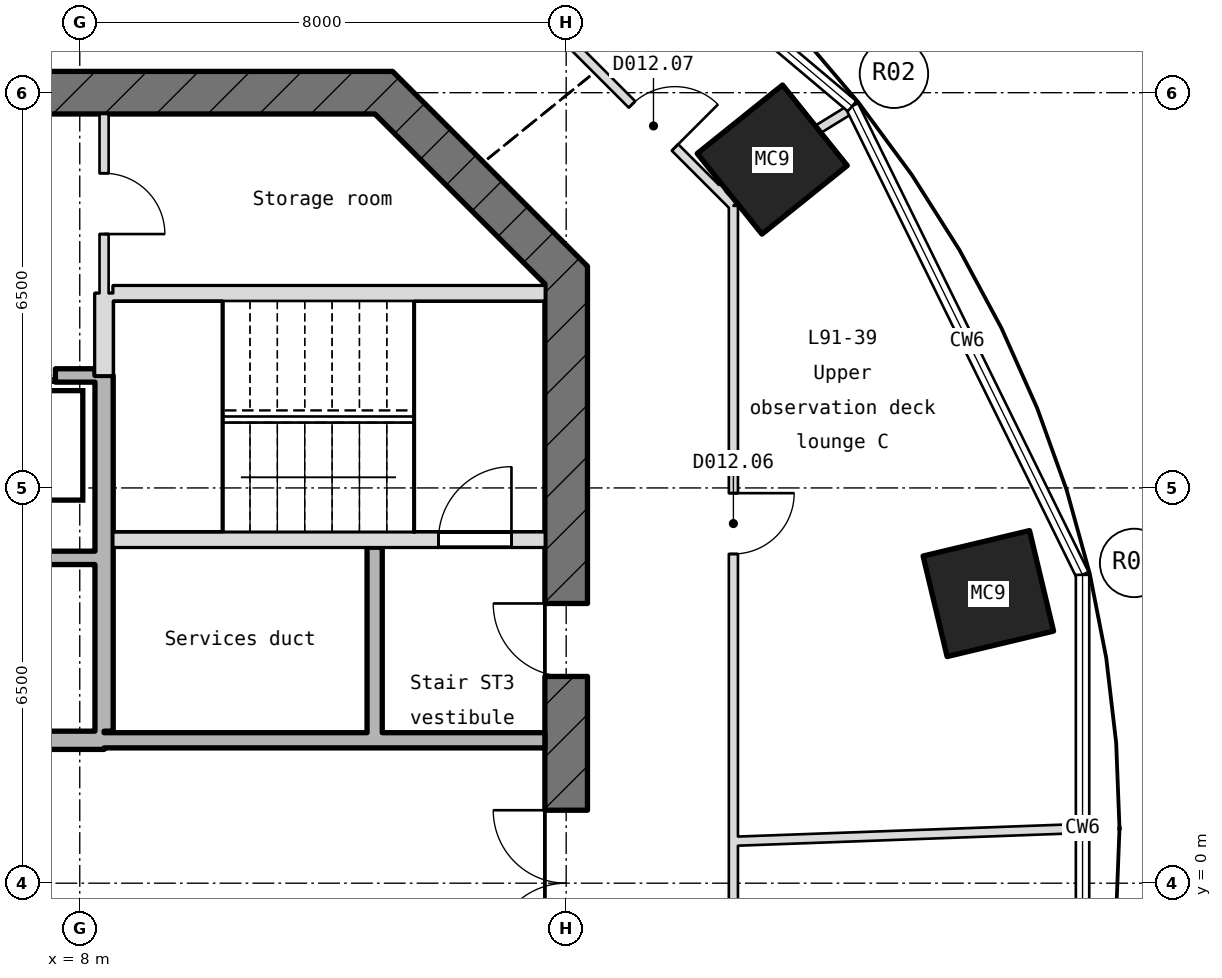
"""IFC4 building model, lengths in metres.
Left out: names, types, materials, properties, quantities, classifications, styles, units other than length and angle.
Written with IfcOpenShell. Run it as: python <this file> out.ifc"""

import sys

from ifc_helpers import new_model, si_unit, direction, frame, frame_2d, origin, origin_2d, place, context, subcontext, project, spatial, rectangle, hollow_rectangle, extrude, element, fill, save


model = new_model("IFC4")
c1 = context("Model", 3, precision=1e-05, world=origin(), true_north=direction((0.0, 1.0)))
c2 = subcontext(c1, "Body", "Model", "MODEL_VIEW")
j1 = project(units=[si_unit("LENGTHUNIT", "METRE"), si_unit("PLANEANGLEUNIT", "RADIAN")], contexts=[c1])
p1 = place(None, origin())
s1 = spatial("IfcSite", under=j1, at=p1, CompositionType="ELEMENT")
p2 = place(p1, origin())
s2 = spatial("IfcBuilding", under=s1, at=p2, CompositionType="ELEMENT")
p3 = place(p2, frame((0.0, 0.0, 401.95)))
s3 = spatial("IfcBuildingStorey", under=s2, at=p3, CompositionType="ELEMENT", Elevation=401.95)
for number, where, z_axis, x_axis in (
    (1, (22.943, 4.763, -0.25), (0.0, 0.0, 1.0), (0.233, -0.973, 0.0)),
    (2, (19.389, 11.9, -0.25), (0.0, 0.0, 1.0), (0.626, -0.78, 0.0)),
):
    element("IfcColumn", number, at=place(p3, frame(where, z_axis=z_axis, x_axis=x_axis)), inside=s3, PredefinedType="COLUMN", context=c2, shape_type="SweptSolid", body=[
        extrude(hollow_rectangle(XDim=1.7, YDim=1.8, WallThickness=0.05, at=origin_2d()), origin(), (0.0, 0.0, 1.0), 5.55),
    ])
p4 = place(p3, frame((16.0, -10.145, -0.25), z_axis=(0.0, 0.0, 1.0), x_axis=(0.0, 1.0, 0.0)))
e3 = element("IfcWall", 3, at=p4, inside=s3, PredefinedType="SHEAR", context=c2, shape_type="SweptSolid", body=[
    extrude(rectangle(XDim=20.29, YDim=0.7, at=frame_2d((10.145, 0.0))), origin(), (0.0, 0.0, 1.0), 5.55),
])
p5 = place(p4, frame((8.945, 0.0, 0.25)))
e4 = element("IfcOpeningElement", 4, at=p5, cuts=e3, PredefinedType="OPENING", context=c2, shape_type="SweptSolid", body=[
    extrude(rectangle(XDim=2.4, YDim=2.1, at=frame_2d((1.2, 1.05))), frame((0.0, 0.36, 0.0), z_axis=(0.0, -1.0, 0.0), x_axis=(1.0, 0.0, 0.0)), (0.0, 0.0, 1.0), 0.72),
])
p6 = place(p4, frame((13.545, 0.0, 0.25)))
e5 = element("IfcOpeningElement", 5, at=p6, cuts=e3, PredefinedType="OPENING", context=c2, shape_type="SweptSolid", body=[
    extrude(rectangle(XDim=1.2, YDim=2.1, at=frame_2d((0.6, 1.05))), frame((0.0, 0.36, 0.0), z_axis=(0.0, -1.0, 0.0), x_axis=(1.0, 0.0, 0.0)), (0.0, 0.0, 1.0), 0.72),
])
p7 = place(p4, frame((2.4, 0.0, 0.25)))
e6 = element("IfcOpeningElement", 6, at=p7, cuts=e3, PredefinedType="OPENING", context=c2, shape_type="SweptSolid", body=[
    extrude(rectangle(XDim=1.2, YDim=2.1, at=frame_2d((0.6, 1.05))), frame((0.0, 0.36, 0.0), z_axis=(0.0, -1.0, 0.0), x_axis=(1.0, 0.0, 0.0)), (0.0, 0.0, 1.0), 0.72),
])
p8 = place(p3, frame((16.103, 9.897, -0.25), z_axis=(0.0, 0.0, 1.0), x_axis=(-0.707106781187, 0.707106781187, 0.0)))
e7 = element("IfcWall", 7, at=p8, inside=s3, PredefinedType="SHEAR", context=c2, shape_type="SweptSolid", body=[
    extrude(rectangle(XDim=4.533, YDim=0.7, at=frame_2d((2.266, 0.0))), origin(), (0.0, 0.0, 1.0), 5.55),
])
p9 = place(p3, frame((13.145, 13.0, -0.25), z_axis=(0.0, 0.0, 1.0), x_axis=(-1.0, 0.0, 0.0)))
e8 = element("IfcWall", 8, at=p9, inside=s3, PredefinedType="SHEAR", context=c2, shape_type="SweptSolid", body=[
    extrude(rectangle(XDim=26.29, YDim=0.7, at=frame_2d((13.145, 0.0))), origin(), (0.0, 0.0, 1.0), 5.55),
])
p10 = place(p9, frame((11.945, 0.0, 0.25)))
e9 = element("IfcOpeningElement", 9, at=p10, cuts=e8, PredefinedType="OPENING", context=c2, shape_type="SweptSolid", body=[
    extrude(rectangle(XDim=2.4, YDim=2.1, at=frame_2d((1.2, 1.05))), frame((0.0, 0.36, 0.0), z_axis=(0.0, -1.0, 0.0), x_axis=(1.0, 0.0, 0.0)), (0.0, 0.0, 1.0), 0.72),
])
p11 = place(p3, frame((-8.4, 2.35, -0.25), z_axis=(0.0, 0.0, 1.0), x_axis=(1.0, 0.0, 0.0)))
e10 = element("IfcWall", 10, at=p11, inside=s3, PredefinedType="SHEAR", context=c2, shape_type="SweptSolid", body=[
    extrude(rectangle(XDim=16.8, YDim=0.3, at=frame_2d((8.4, 0.0))), origin(), (0.0, 0.0, 1.0), 5.55),
])
p12 = place(p11, frame((0.9, 0.0, 0.25)))
e11 = element("IfcOpeningElement", 11, at=p12, cuts=e10, PredefinedType="OPENING", context=c2, shape_type="SweptSolid", body=[
    extrude(rectangle(XDim=1.0, YDim=2.1, at=frame_2d((0.5, 1.05))), frame((0.0, 0.16, 0.0), z_axis=(0.0, -1.0, 0.0), x_axis=(1.0, 0.0, 0.0)), (0.0, 0.0, 1.0), 0.32),
])
p13 = place(p11, frame((14.9, 0.0, 0.25)))
e12 = element("IfcOpeningElement", 12, at=p13, cuts=e10, PredefinedType="OPENING", context=c2, shape_type="SweptSolid", body=[
    extrude(rectangle(XDim=1.0, YDim=2.1, at=frame_2d((0.5, 1.05))), frame((0.0, 0.16, 0.0), z_axis=(0.0, -1.0, 0.0), x_axis=(1.0, 0.0, 0.0)), (0.0, 0.0, 1.0), 0.32),
])
p14 = place(p3, frame((8.4, 2.35, 0.0), z_axis=(0.0, 0.0, 1.0), x_axis=(1.0, 0.0, 0.0)))
e13 = element("IfcWall", 13, at=p14, inside=s3, PredefinedType="STANDARD", context=c2, shape_type="SweptSolid", body=[
    extrude(rectangle(XDim=7.25, YDim=0.25, at=frame_2d((3.625, 0.0))), origin(), (0.0, 0.0, 1.0), 5.3),
])
p15 = place(p3, frame((2.8, 5.35, 0.0), z_axis=(0.0, 0.0, 1.0), x_axis=(1.0, 0.0, 0.0)))
e14 = element("IfcWall", 14, at=p15, inside=s3, PredefinedType="STANDARD", context=c2, shape_type="SweptSolid", body=[
    extrude(rectangle(XDim=5.45, YDim=0.22, at=frame_2d((2.725, 0.0))), origin(), (0.0, 0.0, 1.0), 5.3),
])
p16 = place(p3, frame((8.55, 5.65, -0.25), z_axis=(0.0, 0.0, 1.0), x_axis=(1.0, 0.0, 0.0)))
e15 = element("IfcWall", 15, at=p16, inside=s3, PredefinedType="SHEAR", context=c2, shape_type="SweptSolid", body=[
    extrude(rectangle(XDim=7.1, YDim=0.25, at=frame_2d((3.55, 0.0))), origin(), (0.0, 0.0, 1.0), 5.55),
])
p17 = place(p16, frame((5.35, 0.0, 0.25)))
e16 = element("IfcOpeningElement", 16, at=p17, cuts=e15, PredefinedType="OPENING", context=c2, shape_type="SweptSolid", body=[
    extrude(rectangle(XDim=1.2, YDim=2.1, at=frame_2d((0.6, 1.05))), frame((0.0, 0.135, 0.0), z_axis=(0.0, -1.0, 0.0), x_axis=(1.0, 0.0, 0.0)), (0.0, 0.0, 1.0), 0.27),
])
p18 = place(p3, frame((2.8, 8.35, 0.0), z_axis=(0.0, 0.0, 1.0), x_axis=(1.0, 0.0, 0.0)))
e17 = element("IfcWall", 17, at=p18, inside=s3, PredefinedType="STANDARD", context=c2, shape_type="SweptSolid", body=[
    extrude(rectangle(XDim=5.45, YDim=0.22, at=frame_2d((2.725, 0.0))), origin(), (0.0, 0.0, 1.0), 5.3),
])
p19 = place(p18, frame((0.8, 0.0, 0.0)))
e18 = element("IfcOpeningElement", 18, at=p19, cuts=e17, PredefinedType="OPENING", context=c2, shape_type="SweptSolid", body=[
    extrude(rectangle(XDim=1.2, YDim=2.1, at=frame_2d((0.6, 1.05))), frame((0.0, 0.12, 0.0), z_axis=(0.0, -1.0, 0.0), x_axis=(1.0, 0.0, 0.0)), (0.0, 0.0, 1.0), 0.24),
])
p20 = place(p18, frame((3.6, 0.0, 0.0)))
e19 = element("IfcOpeningElement", 19, at=p20, cuts=e17, PredefinedType="OPENING", context=c2, shape_type="SweptSolid", body=[
    extrude(rectangle(XDim=1.2, YDim=2.1, at=frame_2d((0.6, 1.05))), frame((0.0, 0.12, 0.0), z_axis=(0.0, -1.0, 0.0), x_axis=(1.0, 0.0, 0.0)), (0.0, 0.0, 1.0), 0.24),
])
p21 = place(p3, frame((8.55, 9.7, -0.25), z_axis=(0.0, 0.0, 1.0), x_axis=(1.0, 0.0, 0.0)))
e20 = element("IfcWall", 20, at=p21, inside=s3, PredefinedType="SHEAR", context=c2, shape_type="SweptSolid", body=[
    extrude(rectangle(XDim=7.1, YDim=0.25, at=frame_2d((3.55, 0.0))), origin(), (0.0, 0.0, 1.0), 5.55),
])
p22 = place(p3, frame((8.4, 2.5, -0.25), z_axis=(0.0, 0.0, 1.0), x_axis=(0.0, 1.0, 0.0)))
e21 = element("IfcWall", 21, at=p22, inside=s3, PredefinedType="SHEAR", context=c2, shape_type="SweptSolid", body=[
    extrude(rectangle(XDim=5.85, YDim=0.3, at=frame_2d((2.925, 0.0))), origin(), (0.0, 0.0, 1.0), 5.55),
])
p23 = place(p3, frame((8.4, 8.35, -0.25), z_axis=(0.0, 0.0, 1.0), x_axis=(0.0, 1.0, 0.0)))
e22 = element("IfcWall", 22, at=p23, inside=s3, PredefinedType="SHEAR", context=c2, shape_type="SweptSolid", body=[
    extrude(rectangle(XDim=1.35, YDim=0.3, at=frame_2d((0.675, 0.0))), origin(), (0.0, 0.0, 1.0), 5.55),
])
p24 = place(p3, frame((8.4, 9.7, 0.0), z_axis=(0.0, 0.0, 1.0), x_axis=(0.0, 1.0, 0.0)))
e23 = element("IfcWall", 23, at=p24, inside=s3, PredefinedType="PARTITIONING", context=c2, shape_type="SweptSolid", body=[
    extrude(rectangle(XDim=2.95, YDim=0.15, at=frame_2d((1.475, 0.0))), origin(), (0.0, 0.0, 1.0), 5.3),
])
p25 = place(p24, frame((0.975, 0.0, 0.0)))
e24 = element("IfcOpeningElement", 24, at=p25, cuts=e23, PredefinedType="OPENING", context=c2, shape_type="SweptSolid", body=[
    extrude(rectangle(XDim=1.0, YDim=2.1, at=frame_2d((0.5, 1.05))), frame((0.0, 0.085, 0.0), z_axis=(0.0, -1.0, 0.0), x_axis=(1.0, 0.0, 0.0)), (0.0, 0.0, 1.0), 0.17),
])
p26 = place(p3, frame((12.85, 2.475, 0.0), z_axis=(0.0, 0.0, 1.0), x_axis=(0.0, 1.0, 0.0)))
e25 = element("IfcWall", 25, at=p26, inside=s3, PredefinedType="STANDARD", context=c2, shape_type="SweptSolid", body=[
    extrude(rectangle(XDim=3.05, YDim=0.25, at=frame_2d((1.525, 0.0))), origin(), (0.0, 0.0, 1.0), 5.3),
])
p27 = place(p3, frame((18.75, 0.689, 0.0), z_axis=(0.0, 0.0, 1.0), x_axis=(0.999324436598, 0.036751468252, 0.0)))
e26 = element("IfcWall", 26, at=p27, inside=s3, PredefinedType="PARTITIONING", context=c2, shape_type="SweptSolid", body=[
    extrude(rectangle(XDim=5.726, YDim=0.15, at=frame_2d((2.863, 0.0))), origin(), (0.0, 0.0, 1.0), 5.3),
])
p28 = place(p3, frame((18.501, 11.388, 0.0), z_axis=(0.0, 0.0, 1.0), x_axis=(0.851577096896, 0.524229384946, 0.0)))
e27 = element("IfcWall", 27, at=p28, inside=s3, PredefinedType="PARTITIONING", context=c2, shape_type="SweptSolid", body=[
    extrude(rectangle(XDim=2.581, YDim=0.15, at=frame_2d((1.29, 0.0))), origin(), (0.0, 0.0, 1.0), 5.3),
])
p29 = place(p3, frame((18.75, -11.139, 0.0), z_axis=(0.0, 0.0, 1.0), x_axis=(0.0, 1.0, 0.0)))
e28 = element("IfcWall", 28, at=p29, inside=s3, PredefinedType="PARTITIONING", context=c2, shape_type="SweptSolid", body=[
    extrude(rectangle(XDim=22.278, YDim=0.15, at=frame_2d((11.139, 0.0))), origin(), (0.0, 0.0, 1.0), 5.3),
])
p30 = place(p29, frame((5.998, 0.0, 0.0)))
e29 = element("IfcOpeningElement", 29, at=p30, cuts=e28, PredefinedType="OPENING", context=c2, shape_type="SweptSolid", body=[
    extrude(rectangle(XDim=1.0, YDim=2.1, at=frame_2d((0.5, 1.05))), frame((0.0, 0.085, 0.0), z_axis=(0.0, -1.0, 0.0), x_axis=(1.0, 0.0, 0.0)), (0.0, 0.0, 1.0), 0.17),
])
p31 = place(p29, frame((16.553, 0.0, 0.0)))
e30 = element("IfcOpeningElement", 30, at=p31, cuts=e28, PredefinedType="OPENING", context=c2, shape_type="SweptSolid", body=[
    extrude(rectangle(XDim=1.0, YDim=2.1, at=frame_2d((0.5, 1.05))), frame((0.0, 0.085, 0.0), z_axis=(0.0, -1.0, 0.0), x_axis=(1.0, 0.0, 0.0)), (0.0, 0.0, 1.0), 0.17),
])
p32 = place(p3, frame((18.75, 11.139, 0.0), z_axis=(0.0, 0.0, 1.0), x_axis=(-0.707106781187, 0.707106781187, 0.0)))
e31 = element("IfcWall", 31, at=p32, inside=s3, PredefinedType="PARTITIONING", context=c2, shape_type="SweptSolid", body=[
    extrude(rectangle(XDim=4.44, YDim=0.15, at=frame_2d((2.22, 0.0))), origin(), (0.0, 0.0, 1.0), 5.3),
])
p33 = place(p32, frame((1.359, 0.0, 0.0)))
e32 = element("IfcOpeningElement", 32, at=p33, cuts=e31, PredefinedType="OPENING", context=c2, shape_type="SweptSolid", body=[
    extrude(rectangle(XDim=1.0, YDim=2.1, at=frame_2d((0.5, 1.05))), frame((0.0, 0.085, 0.0), z_axis=(0.0, -1.0, 0.0), x_axis=(1.0, 0.0, 0.0)), (0.0, 0.0, 1.0), 0.17),
])
p34 = place(p20, origin())
e33 = element("IfcDoor", 33, at=p34, inside=s3, OperationType="DOUBLE_DOOR_SLIDING", PredefinedType="DOOR", context=c2, shape_type="SweptSolid", body=[
    extrude(rectangle(XDim=1.2, YDim=2.1, at=frame_2d((0.6, 1.05))), frame((0.0, 0.025, 0.0), z_axis=(0.0, -1.0, 0.0), x_axis=(1.0, 0.0, 0.0)), (0.0, 0.0, 1.0), 0.05),
])
fill(e19, e33)
p35 = place(p17, origin())
e34 = element("IfcDoor", 34, at=p35, inside=s3, OperationType="SINGLE_SWING_RIGHT", PredefinedType="DOOR", context=c2, shape_type="SweptSolid", body=[
    extrude(rectangle(XDim=1.2, YDim=2.1, at=frame_2d((0.6, 1.05))), frame((0.0, 0.025, 0.0), z_axis=(0.0, -1.0, 0.0), x_axis=(1.0, 0.0, 0.0)), (0.0, 0.0, 1.0), 0.05),
])
fill(e16, e34)
p36 = place(p5, origin())
e35 = element("IfcDoor", 35, at=p36, inside=s3, OperationType="DOUBLE_DOOR_SINGLE_SWING", PredefinedType="DOOR", context=c2, shape_type="SweptSolid", body=[
    extrude(rectangle(XDim=2.4, YDim=2.1, at=frame_2d((1.2, 1.05))), frame((0.0, 0.025, 0.0), z_axis=(0.0, -1.0, 0.0), x_axis=(1.0, 0.0, 0.0)), (0.0, 0.0, 1.0), 0.05),
])
fill(e4, e35)
p37 = place(p6, origin())
e36 = element("IfcDoor", 36, at=p37, inside=s3, OperationType="SINGLE_SWING_RIGHT", PredefinedType="DOOR", context=c2, shape_type="SweptSolid", body=[
    extrude(rectangle(XDim=1.2, YDim=2.1, at=frame_2d((0.6, 1.05))), frame((0.0, 0.025, 0.0), z_axis=(0.0, -1.0, 0.0), x_axis=(1.0, 0.0, 0.0)), (0.0, 0.0, 1.0), 0.05),
])
fill(e5, e36)
p38 = place(p25, frame((1.0, 0.0, 0.0), z_axis=(0.0, 0.0, 1.0), x_axis=(-1.0, 0.0, 0.0)))
e37 = element("IfcDoor", 37, at=p38, inside=s3, OperationType="SINGLE_SWING_LEFT", PredefinedType="DOOR", context=c2, shape_type="SweptSolid", body=[
    extrude(rectangle(XDim=1.0, YDim=2.1, at=frame_2d((0.5, 1.05))), frame((0.0, 0.025, 0.0), z_axis=(0.0, -1.0, 0.0), x_axis=(1.0, 0.0, 0.0)), (0.0, 0.0, 1.0), 0.05),
])
fill(e24, e37)
p39 = place(p31, frame((1.0, 0.0, 0.0), z_axis=(0.0, 0.0, 1.0), x_axis=(-1.0, 0.0, 0.0)))
e38 = element("IfcDoor", 38, at=p39, inside=s3, OperationType="SINGLE_SWING_LEFT", PredefinedType="DOOR", context=c2, shape_type="SweptSolid", body=[
    extrude(rectangle(XDim=1.0, YDim=2.1, at=frame_2d((0.5, 1.05))), frame((0.0, 0.025, 0.0), z_axis=(0.0, -1.0, 0.0), x_axis=(1.0, 0.0, 0.0)), (0.0, 0.0, 1.0), 0.05),
])
fill(e30, e38)
p40 = place(p33, frame((1.0, 0.0, 0.0), z_axis=(0.0, 0.0, 1.0), x_axis=(-1.0, 0.0, 0.0)))
e39 = element("IfcDoor", 39, at=p40, inside=s3, OperationType="SINGLE_SWING_LEFT", PredefinedType="DOOR", context=c2, shape_type="SweptSolid", body=[
    extrude(rectangle(XDim=1.0, YDim=2.1, at=frame_2d((0.5, 1.05))), frame((0.0, 0.025, 0.0), z_axis=(0.0, -1.0, 0.0), x_axis=(1.0, 0.0, 0.0)), (0.0, 0.0, 1.0), 0.05),
])
fill(e32, e39)
save(model, sys.argv[1])
